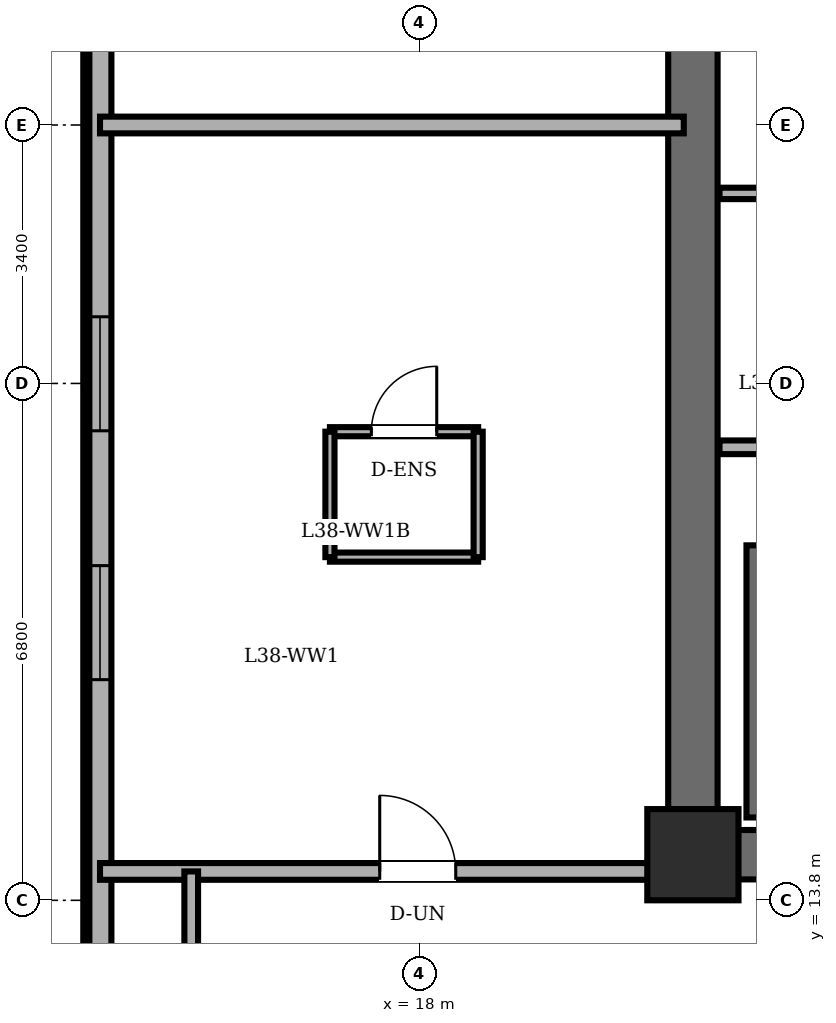
"""IFC4 building model, lengths in metres.
Left out: names, types, materials, properties, quantities, classifications, styles, units other than length and angle.
Written with IfcOpenShell. Run it as: python <this file> out.ifc"""

import sys

from ifc_helpers import new_model, si_unit, direction, frame, frame_2d, origin, origin_2d, place, context, subcontext, project, spatial, rectangle, extrude, element, fill, save


model = new_model("IFC4")
c1 = context("Model", 3, precision=1e-05, world=origin(), true_north=direction((0.0, 1.0)))
c2 = subcontext(c1, "Body", "Model", "MODEL_VIEW")
j1 = project(units=[si_unit("LENGTHUNIT", "METRE"), si_unit("PLANEANGLEUNIT", "RADIAN")], contexts=[c1])
p1 = place(None, origin())
s1 = spatial("IfcSite", under=j1, at=p1, CompositionType="ELEMENT")
p2 = place(p1, origin())
s2 = spatial("IfcBuilding", under=s1, at=p2, CompositionType="ELEMENT")
p3 = place(p2, frame((0.0, 0.0, 147.4)))
s3 = spatial("IfcBuildingStorey", under=s2, at=p3, CompositionType="ELEMENT", Elevation=147.4)
p4 = place(p3, frame((21.6, 14.4, 0.0), z_axis=(0.0, 0.0, 1.0), x_axis=(1.0, 0.0, 0.0)))
e1 = element("IfcColumn", 1, at=p4, inside=s3, PredefinedType="COLUMN", context=c2, shape_type="SweptSolid", body=[
    extrude(rectangle(XDim=1.2, YDim=1.2, at=origin_2d()), origin(), (0.0, 0.0, 1.0), 3.6),
])
p5 = place(p3, frame((13.8, 36.3, 0.0), z_axis=(0.0, 0.0, 1.0), x_axis=(0.0, -1.0, 0.0)))
e2 = element("IfcWall", 2, at=p5, inside=s3, PredefinedType="SOLIDWALL", context=c2, shape_type="SweptSolid", body=[
    extrude(rectangle(XDim=24.6, YDim=0.3, at=frame_2d((12.3, 0.0))), origin(), (0.0, 0.0, 1.0), 3.4),
])
p6 = place(p5, frame((5.003, 0.0, 0.85)))
e3 = element("IfcOpeningElement", 3, at=p6, cuts=e2, PredefinedType="OPENING", context=c2, shape_type="SweptSolid", body=[
    extrude(rectangle(XDim=1.5, YDim=1.55, at=frame_2d((0.75, 0.775))), frame((0.0, 0.16, 0.0), z_axis=(0.0, -1.0, 0.0), x_axis=(1.0, 0.0, 0.0)), (0.0, 0.0, 1.0), 0.32),
])
p7 = place(p5, frame((8.277, 0.0, 0.85)))
e4 = element("IfcOpeningElement", 4, at=p7, cuts=e2, PredefinedType="OPENING", context=c2, shape_type="SweptSolid", body=[
    extrude(rectangle(XDim=1.5, YDim=1.55, at=frame_2d((0.75, 0.775))), frame((0.0, 0.16, 0.0), z_axis=(0.0, -1.0, 0.0), x_axis=(1.0, 0.0, 0.0)), (0.0, 0.0, 1.0), 0.32),
])
p8 = place(p5, frame((14.823, 0.0, 0.85)))
e5 = element("IfcOpeningElement", 5, at=p8, cuts=e2, PredefinedType="OPENING", context=c2, shape_type="SweptSolid", body=[
    extrude(rectangle(XDim=1.5, YDim=1.55, at=frame_2d((0.75, 0.775))), frame((0.0, 0.16, 0.0), z_axis=(0.0, -1.0, 0.0), x_axis=(1.0, 0.0, 0.0)), (0.0, 0.0, 1.0), 0.32),
])
p9 = place(p5, frame((18.097, 0.0, 0.85)))
e6 = element("IfcOpeningElement", 6, at=p9, cuts=e2, PredefinedType="OPENING", context=c2, shape_type="SweptSolid", body=[
    extrude(rectangle(XDim=1.5, YDim=1.55, at=frame_2d((0.75, 0.775))), frame((0.0, 0.16, 0.0), z_axis=(0.0, -1.0, 0.0), x_axis=(1.0, 0.0, 0.0)), (0.0, 0.0, 1.0), 0.32),
])
p10 = place(p3, frame((21.6, 14.4, 0.0), z_axis=(0.0, 0.0, 1.0), x_axis=(0.0, 1.0, 0.0)))
e7 = element("IfcWall", 7, at=p10, inside=s3, PredefinedType="SHEAR", context=c2, shape_type="SweptSolid", body=[
    extrude(rectangle(XDim=19.2, YDim=0.65, at=frame_2d((9.6, 0.0))), origin(), (0.0, 0.0, 1.0), 3.4),
])
p11 = place(p3, frame((37.2, 14.4, 0.0), z_axis=(0.0, 0.0, 1.0), x_axis=(-1.0, 0.0, 0.0)))
e8 = element("IfcWall", 8, at=p11, inside=s3, PredefinedType="SHEAR", context=c2, shape_type="SweptSolid", body=[
    extrude(rectangle(XDim=15.6, YDim=0.65, at=frame_2d((7.8, 0.0))), origin(), (0.0, 0.0, 1.0), 3.4),
])
p12 = place(p3, frame((22.48, 14.89, 0.0), z_axis=(0.0, 0.0, 1.0), x_axis=(0.0, 1.0, 0.0)))
e9 = element("IfcWall", 9, at=p12, inside=s3, PredefinedType="SOLIDWALL", context=c2, shape_type="SweptSolid", body=[
    extrude(rectangle(XDim=3.58, YDim=0.35, at=frame_2d((1.79, 0.0))), origin(), (0.0, 0.0, 1.0), 3.4),
])
p13 = place(p3, frame((21.95, 19.76, 0.0), z_axis=(0.0, 0.0, 1.0), x_axis=(1.0, 0.0, 0.0)))
e10 = element("IfcWall", 10, at=p13, inside=s3, PredefinedType="PARTITIONING", context=c2, shape_type="SweptSolid", body=[
    extrude(rectangle(XDim=14.87, YDim=0.18, at=frame_2d((7.435, 0.0))), origin(), (0.0, 0.0, 1.0), 3.4),
])
p14 = place(p3, frame((21.95, 23.1, 0.0), z_axis=(0.0, 0.0, 1.0), x_axis=(1.0, 0.0, 0.0)))
e11 = element("IfcWall", 11, at=p14, inside=s3, PredefinedType="PARTITIONING", context=c2, shape_type="SweptSolid", body=[
    extrude(rectangle(XDim=2.51, YDim=0.15, at=frame_2d((1.255, 0.0))), origin(), (0.0, 0.0, 1.0), 3.4),
])
p15 = place(p3, frame((16.825, 19.965, 0.0), z_axis=(0.0, 0.0, 1.0), x_axis=(1.0, 0.0, 0.0)))
e12 = element("IfcWall", 12, at=p15, inside=s3, PredefinedType="PARTITIONING", context=c2, shape_type="SweptSolid", body=[
    extrude(rectangle(XDim=1.95, YDim=0.12, at=frame_2d((0.975, 0.0))), origin(), (0.0, 0.0, 1.0), 3.4),
])
p16 = place(p15, frame((0.545, 0.0, 0.0)))
e13 = element("IfcOpeningElement", 13, at=p16, cuts=e12, PredefinedType="OPENING", context=c2, shape_type="SweptSolid", body=[
    extrude(rectangle(XDim=0.86, YDim=2.1, at=frame_2d((0.43, 1.05))), frame((0.0, 0.07, 0.0), z_axis=(0.0, -1.0, 0.0), x_axis=(1.0, 0.0, 0.0)), (0.0, 0.0, 1.0), 0.14),
])
p17 = place(p3, frame((18.775, 18.315, 0.0), z_axis=(0.0, 0.0, 1.0), x_axis=(-1.0, 0.0, 0.0)))
e14 = element("IfcWall", 14, at=p17, inside=s3, PredefinedType="PARTITIONING", context=c2, shape_type="SweptSolid", body=[
    extrude(rectangle(XDim=1.95, YDim=0.12, at=frame_2d((0.975, 0.0))), origin(), (0.0, 0.0, 1.0), 3.4),
])
for number, where, z_axis, x_axis in (
    (15, (16.825, 19.965, 0.0), (0.0, 0.0, 1.0), (0.0, -1.0, 0.0)),
    (16, (18.775, 18.315, 0.0), (0.0, 0.0, 1.0), (0.0, 1.0, 0.0)),
):
    element("IfcWall", number, at=place(p3, frame(where, z_axis=z_axis, x_axis=x_axis)), inside=s3, PredefinedType="PARTITIONING", context=c2, shape_type="SweptSolid", body=[
        extrude(rectangle(XDim=1.65, YDim=0.12, at=frame_2d((0.825, 0.0))), origin(), (0.0, 0.0, 1.0), 3.4),
    ])
p18 = place(p3, frame((13.8, 14.18, 0.0), z_axis=(0.0, 0.0, 1.0), x_axis=(1.0, 0.0, 0.0)))
e17 = element("IfcWall", 17, at=p18, inside=s3, PredefinedType="PARTITIONING", context=c2, shape_type="SweptSolid", body=[
    extrude(rectangle(XDim=7.68, YDim=0.22, at=frame_2d((3.84, 0.0))), origin(), (0.0, 0.0, 1.0), 3.4),
])
p19 = place(p18, frame((3.68, 0.0, 0.0)))
e18 = element("IfcOpeningElement", 18, at=p19, cuts=e17, PredefinedType="OPENING", context=c2, shape_type="SweptSolid", body=[
    extrude(rectangle(XDim=1.0, YDim=2.15, at=frame_2d((0.5, 1.075))), frame((0.0, 0.12, 0.0), z_axis=(0.0, -1.0, 0.0), x_axis=(1.0, 0.0, 0.0)), (0.0, 0.0, 1.0), 0.24),
])
p20 = place(p3, frame((13.8, 24.0, 0.0), z_axis=(0.0, 0.0, 1.0), x_axis=(1.0, 0.0, 0.0)))
e19 = element("IfcWall", 19, at=p20, inside=s3, PredefinedType="PARTITIONING", context=c2, shape_type="SweptSolid", body=[
    extrude(rectangle(XDim=7.68, YDim=0.22, at=frame_2d((3.84, 0.0))), origin(), (0.0, 0.0, 1.0), 3.4),
])
p21 = place(p3, frame((15.0, 8.487, 0.0), z_axis=(0.0, 0.0, 1.0), x_axis=(0.0, 1.0, 0.0)))
e20 = element("IfcWall", 20, at=p21, inside=s3, PredefinedType="PARTITIONING", context=c2, shape_type="SweptSolid", body=[
    extrude(rectangle(XDim=5.693, YDim=0.18, at=frame_2d((2.846, 0.0))), origin(), (0.0, 0.0, 1.0), 3.4),
])
p22 = place(p8, origin())
e21 = element("IfcWindow", 21, at=p22, inside=s3, PartitioningType="DOUBLE_PANEL_VERTICAL", PredefinedType="WINDOW", context=c2, shape_type="SweptSolid", body=[
    extrude(rectangle(XDim=1.5, YDim=1.55, at=frame_2d((0.75, 0.775))), frame((0.0, 0.03, 0.0), z_axis=(0.0, -1.0, 0.0), x_axis=(1.0, 0.0, 0.0)), (0.0, 0.0, 1.0), 0.06),
])
fill(e5, e21)
p23 = place(p9, origin())
e22 = element("IfcWindow", 22, at=p23, inside=s3, PartitioningType="DOUBLE_PANEL_VERTICAL", PredefinedType="WINDOW", context=c2, shape_type="SweptSolid", body=[
    extrude(rectangle(XDim=1.5, YDim=1.55, at=frame_2d((0.75, 0.775))), frame((0.0, 0.03, 0.0), z_axis=(0.0, -1.0, 0.0), x_axis=(1.0, 0.0, 0.0)), (0.0, 0.0, 1.0), 0.06),
])
fill(e6, e22)
p24 = place(p16, origin())
e23 = element("IfcDoor", 23, at=p24, inside=s3, OperationType="SINGLE_SWING_RIGHT", PredefinedType="DOOR", context=c2, shape_type="SweptSolid", body=[
    extrude(rectangle(XDim=0.86, YDim=2.1, at=frame_2d((0.43, 1.05))), frame((0.0, 0.025, 0.0), z_axis=(0.0, -1.0, 0.0), x_axis=(1.0, 0.0, 0.0)), (0.0, 0.0, 1.0), 0.05),
])
fill(e13, e23)
p25 = place(p19, origin())
e24 = element("IfcDoor", 24, at=p25, inside=s3, OperationType="SINGLE_SWING_LEFT", PredefinedType="DOOR", context=c2, shape_type="SweptSolid", body=[
    extrude(rectangle(XDim=1.0, YDim=2.15, at=frame_2d((0.5, 1.075))), frame((0.0, 0.025, 0.0), z_axis=(0.0, -1.0, 0.0), x_axis=(1.0, 0.0, 0.0)), (0.0, 0.0, 1.0), 0.05),
])
fill(e18, e24)
save(model, sys.argv[1])
